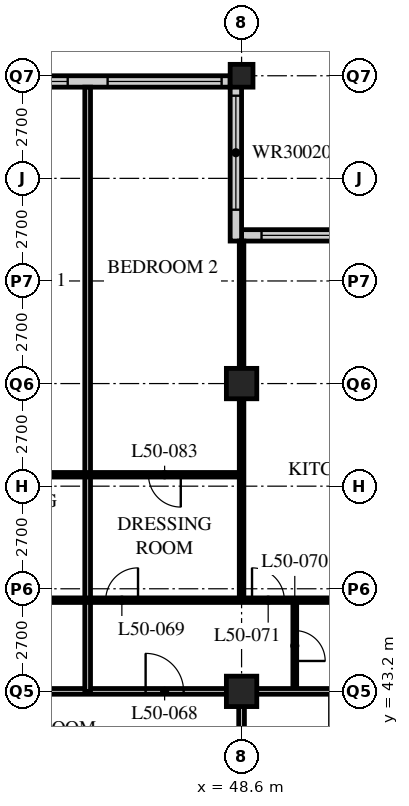
"""IFC4 building model, lengths in metres.
Left out: names, types, materials, properties, quantities, classifications, styles, units other than length and angle.
Written with IfcOpenShell. Run it as: python <this file> out.ifc"""

import sys

from ifc_helpers import new_model, si_unit, direction, frame, frame_2d, origin, origin_2d, place, context, subcontext, project, spatial, rectangle, hollow_rectangle, extrude, element, fill, save


model = new_model("IFC4")
c1 = context("Model", 3, precision=1e-05, world=origin(), true_north=direction((0.0, 1.0)))
c2 = subcontext(c1, "Body", "Model", "MODEL_VIEW")
j1 = project(units=[si_unit("LENGTHUNIT", "METRE"), si_unit("PLANEANGLEUNIT", "RADIAN")], contexts=[c1])
p1 = place(None, origin())
s1 = spatial("IfcSite", under=j1, at=p1, CompositionType="ELEMENT")
p2 = place(p1, origin())
s2 = spatial("IfcBuilding", under=s1, at=p2, CompositionType="ELEMENT")
p3 = place(p2, frame((0.0, 0.0, 195.6)))
s3 = spatial("IfcBuildingStorey", under=s2, at=p3, CompositionType="ELEMENT", Elevation=195.6)
for number, where, z_axis, x_axis in (
    (1, (48.6, 43.2, 0.0), (0.0, 0.0, 1.0), (1.0, 0.0, 0.0)),
    (2, (48.6, 51.3, 0.0), (0.0, 0.0, 1.0), (1.0, 0.0, 0.0)),
):
    element("IfcColumn", number, at=place(p3, frame(where, z_axis=z_axis, x_axis=x_axis)), inside=s3, PredefinedType="COLUMN", context=c2, shape_type="SweptSolid", body=[
        extrude(hollow_rectangle(XDim=0.8, YDim=0.8, WallThickness=0.08, at=origin_2d()), origin(), (0.0, 0.0, 1.0), 3.6),
    ])
p4 = place(p3, frame((48.6, 59.4, 0.0), z_axis=(0.0, 0.0, 1.0), x_axis=(1.0, 0.0, 0.0)))
e3 = element("IfcColumn", 3, at=p4, inside=s3, PredefinedType="COLUMN", context=c2, shape_type="SweptSolid", body=[
    extrude(hollow_rectangle(XDim=0.6, YDim=0.6, WallThickness=0.05, at=origin_2d()), origin(), (0.0, 0.0, 1.0), 3.6),
])
p5 = place(p3, frame((52.35, 55.2, 0.0), z_axis=(0.0, 0.0, 1.0), x_axis=(-1.0, 0.0, 0.0)))
e4 = element("IfcWall", 4, at=p5, inside=s3, PredefinedType="SOLIDWALL", context=c2, shape_type="SweptSolid", body=[
    extrude(rectangle(XDim=3.75, YDim=0.3, at=frame_2d((1.875, 0.0))), origin(), (0.0, 0.0, 1.0), 3.39),
])
p6 = place(p5, frame((0.225, 0.0, 0.6)))
e5 = element("IfcOpeningElement", 5, at=p6, cuts=e4, PredefinedType="OPENING", context=c2, shape_type="SweptSolid", body=[
    extrude(rectangle(XDim=3.0, YDim=2.0, at=frame_2d((1.5, 1.0))), frame((0.0, 0.16, 0.0), z_axis=(0.0, -1.0, 0.0), x_axis=(1.0, 0.0, 0.0)), (0.0, 0.0, 1.0), 0.32),
])
p7 = place(p3, frame((48.45, 55.05, 0.0), z_axis=(0.0, 0.0, 1.0), x_axis=(0.0, 1.0, 0.0)))
e6 = element("IfcWall", 6, at=p7, inside=s3, PredefinedType="SOLIDWALL", context=c2, shape_type="SweptSolid", body=[
    extrude(rectangle(XDim=4.35, YDim=0.3, at=frame_2d((2.175, 0.0))), origin(), (0.0, 0.0, 1.0), 3.39),
])
p8 = place(p7, frame((0.825, 0.0, 0.6)))
e7 = element("IfcOpeningElement", 7, at=p8, cuts=e6, PredefinedType="OPENING", context=c2, shape_type="SweptSolid", body=[
    extrude(rectangle(XDim=3.0, YDim=2.0, at=frame_2d((1.5, 1.0))), frame((0.0, 0.16, 0.0), z_axis=(0.0, -1.0, 0.0), x_axis=(1.0, 0.0, 0.0)), (0.0, 0.0, 1.0), 0.32),
])
p9 = place(p3, frame((48.3, 59.25, 0.0), z_axis=(0.0, 0.0, 1.0), x_axis=(-1.0, 0.0, 0.0)))
e8 = element("IfcWall", 8, at=p9, inside=s3, PredefinedType="SOLIDWALL", context=c2, shape_type="SweptSolid", body=[
    extrude(rectangle(XDim=40.2, YDim=0.3, at=frame_2d((20.1, 0.0))), origin(), (0.0, 0.0, 1.0), 3.39),
])
p10 = place(p9, frame((0.225, 0.0, 0.6)))
e9 = element("IfcOpeningElement", 9, at=p10, cuts=e8, PredefinedType="OPENING", context=c2, shape_type="SweptSolid", body=[
    extrude(rectangle(XDim=3.0, YDim=2.4, at=frame_2d((1.5, 1.2))), frame((0.0, 0.16, 0.0), z_axis=(0.0, -1.0, 0.0), x_axis=(1.0, 0.0, 0.0)), (0.0, 0.0, 1.0), 0.32),
])
p11 = place(p9, frame((4.275, 0.0, 0.6)))
e10 = element("IfcOpeningElement", 10, at=p11, cuts=e8, PredefinedType="OPENING", context=c2, shape_type="SweptSolid", body=[
    extrude(rectangle(XDim=3.0, YDim=2.4, at=frame_2d((1.5, 1.2))), frame((0.0, 0.16, 0.0), z_axis=(0.0, -1.0, 0.0), x_axis=(1.0, 0.0, 0.0)), (0.0, 0.0, 1.0), 0.32),
])
p12 = place(p9, frame((8.325, 0.0, 0.6)))
e11 = element("IfcOpeningElement", 11, at=p12, cuts=e8, PredefinedType="OPENING", context=c2, shape_type="SweptSolid", body=[
    extrude(rectangle(XDim=3.0, YDim=2.4, at=frame_2d((1.5, 1.2))), frame((0.0, 0.16, 0.0), z_axis=(0.0, -1.0, 0.0), x_axis=(1.0, 0.0, 0.0)), (0.0, 0.0, 1.0), 0.32),
])
p13 = place(p9, frame((12.375, 0.0, 0.6)))
e12 = element("IfcOpeningElement", 12, at=p13, cuts=e8, PredefinedType="OPENING", context=c2, shape_type="SweptSolid", body=[
    extrude(rectangle(XDim=3.0, YDim=2.4, at=frame_2d((1.5, 1.2))), frame((0.0, 0.16, 0.0), z_axis=(0.0, -1.0, 0.0), x_axis=(1.0, 0.0, 0.0)), (0.0, 0.0, 1.0), 0.32),
])
p14 = place(p9, frame((16.425, 0.0, 0.6)))
e13 = element("IfcOpeningElement", 13, at=p14, cuts=e8, PredefinedType="OPENING", context=c2, shape_type="SweptSolid", body=[
    extrude(rectangle(XDim=3.0, YDim=2.4, at=frame_2d((1.5, 1.2))), frame((0.0, 0.16, 0.0), z_axis=(0.0, -1.0, 0.0), x_axis=(1.0, 0.0, 0.0)), (0.0, 0.0, 1.0), 0.32),
])
p15 = place(p9, frame((20.475, 0.0, 0.6)))
e14 = element("IfcOpeningElement", 14, at=p15, cuts=e8, PredefinedType="OPENING", context=c2, shape_type="SweptSolid", body=[
    extrude(rectangle(XDim=3.0, YDim=2.4, at=frame_2d((1.5, 1.2))), frame((0.0, 0.16, 0.0), z_axis=(0.0, -1.0, 0.0), x_axis=(1.0, 0.0, 0.0)), (0.0, 0.0, 1.0), 0.32),
])
p16 = place(p9, frame((24.525, 0.0, 0.6)))
e15 = element("IfcOpeningElement", 15, at=p16, cuts=e8, PredefinedType="OPENING", context=c2, shape_type="SweptSolid", body=[
    extrude(rectangle(XDim=3.0, YDim=2.4, at=frame_2d((1.5, 1.2))), frame((0.0, 0.16, 0.0), z_axis=(0.0, -1.0, 0.0), x_axis=(1.0, 0.0, 0.0)), (0.0, 0.0, 1.0), 0.32),
])
p17 = place(p9, frame((28.575, 0.0, 0.6)))
e16 = element("IfcOpeningElement", 16, at=p17, cuts=e8, PredefinedType="OPENING", context=c2, shape_type="SweptSolid", body=[
    extrude(rectangle(XDim=3.0, YDim=2.4, at=frame_2d((1.5, 1.2))), frame((0.0, 0.16, 0.0), z_axis=(0.0, -1.0, 0.0), x_axis=(1.0, 0.0, 0.0)), (0.0, 0.0, 1.0), 0.32),
])
p18 = place(p9, frame((32.625, 0.0, 0.6)))
e17 = element("IfcOpeningElement", 17, at=p18, cuts=e8, PredefinedType="OPENING", context=c2, shape_type="SweptSolid", body=[
    extrude(rectangle(XDim=3.0, YDim=2.4, at=frame_2d((1.5, 1.2))), frame((0.0, 0.16, 0.0), z_axis=(0.0, -1.0, 0.0), x_axis=(1.0, 0.0, 0.0)), (0.0, 0.0, 1.0), 0.32),
])
p19 = place(p9, frame((36.675, 0.0, 0.6)))
e18 = element("IfcOpeningElement", 18, at=p19, cuts=e8, PredefinedType="OPENING", context=c2, shape_type="SweptSolid", body=[
    extrude(rectangle(XDim=3.0, YDim=2.4, at=frame_2d((1.5, 1.2))), frame((0.0, 0.16, 0.0), z_axis=(0.0, -1.0, 0.0), x_axis=(1.0, 0.0, 0.0)), (0.0, 0.0, 1.0), 0.32),
])
p20 = place(p3, frame((8.1, 43.2, 0.0), z_axis=(0.0, 0.0, 1.0), x_axis=(1.0, 0.0, 0.0)))
e19 = element("IfcWall", 19, at=p20, inside=s3, PredefinedType="PARTITIONING", context=c2, shape_type="SweptSolid", body=[
    extrude(rectangle(XDim=40.5, YDim=0.15, at=frame_2d((20.25, 0.0))), origin(), (0.0, 0.0, 1.0), 2.778),
])
p21 = place(p20, frame((4.45, 0.0, 0.0)))
e20 = element("IfcOpeningElement", 20, at=p21, cuts=e19, PredefinedType="OPENING", context=c2, shape_type="SweptSolid", body=[
    extrude(rectangle(XDim=1.0, YDim=2.1, at=frame_2d((0.5, 1.05))), frame((0.0, 0.085, 0.0), z_axis=(0.0, -1.0, 0.0), x_axis=(1.0, 0.0, 0.0)), (0.0, 0.0, 1.0), 0.17),
])
p22 = place(p20, frame((20.65, 0.0, 0.0)))
e21 = element("IfcOpeningElement", 21, at=p22, cuts=e19, PredefinedType="OPENING", context=c2, shape_type="SweptSolid", body=[
    extrude(rectangle(XDim=1.0, YDim=2.1, at=frame_2d((0.5, 1.05))), frame((0.0, 0.085, 0.0), z_axis=(0.0, -1.0, 0.0), x_axis=(1.0, 0.0, 0.0)), (0.0, 0.0, 1.0), 0.17),
])
p23 = place(p20, frame((28.75, 0.0, 0.0)))
e22 = element("IfcOpeningElement", 22, at=p23, cuts=e19, PredefinedType="OPENING", context=c2, shape_type="SweptSolid", body=[
    extrude(rectangle(XDim=1.0, YDim=2.1, at=frame_2d((0.5, 1.05))), frame((0.0, 0.085, 0.0), z_axis=(0.0, -1.0, 0.0), x_axis=(1.0, 0.0, 0.0)), (0.0, 0.0, 1.0), 0.17),
])
p24 = place(p20, frame((37.975, 0.0, 0.0)))
e23 = element("IfcOpeningElement", 23, at=p24, cuts=e19, PredefinedType="OPENING", context=c2, shape_type="SweptSolid", body=[
    extrude(rectangle(XDim=1.0, YDim=2.1, at=frame_2d((0.5, 1.05))), frame((0.0, 0.085, 0.0), z_axis=(0.0, -1.0, 0.0), x_axis=(1.0, 0.0, 0.0)), (0.0, 0.0, 1.0), 0.17),
])
p25 = place(p20, frame((1.525, 0.0, 0.0)))
e24 = element("IfcOpeningElement", 24, at=p25, cuts=e19, PredefinedType="OPENING", context=c2, shape_type="SweptSolid", body=[
    extrude(rectangle(XDim=1.0, YDim=2.1, at=frame_2d((0.5, 1.05))), frame((0.0, 0.085, 0.0), z_axis=(0.0, -1.0, 0.0), x_axis=(1.0, 0.0, 0.0)), (0.0, 0.0, 1.0), 0.17),
])
p26 = place(p3, frame((48.6, 18.9, 0.0), z_axis=(0.0, 0.0, 1.0), x_axis=(0.0, 1.0, 0.0)))
e25 = element("IfcWall", 25, at=p26, inside=s3, PredefinedType="PARTITIONING", context=c2, shape_type="SweptSolid", body=[
    extrude(rectangle(XDim=24.3, YDim=0.15, at=frame_2d((12.15, 0.0))), origin(), (0.0, 0.0, 1.0), 2.778),
])
p27 = place(p26, frame((2.35, 0.0, 0.0)))
e26 = element("IfcOpeningElement", 26, at=p27, cuts=e25, PredefinedType="OPENING", context=c2, shape_type="SweptSolid", body=[
    extrude(rectangle(XDim=1.0, YDim=2.1, at=frame_2d((0.5, 1.05))), frame((0.0, 0.085, 0.0), z_axis=(0.0, -1.0, 0.0), x_axis=(1.0, 0.0, 0.0)), (0.0, 0.0, 1.0), 0.17),
])
p28 = place(p26, frame((4.75, 0.0, 0.0)))
e27 = element("IfcOpeningElement", 27, at=p28, cuts=e25, PredefinedType="OPENING", context=c2, shape_type="SweptSolid", body=[
    extrude(rectangle(XDim=1.0, YDim=2.1, at=frame_2d((0.5, 1.05))), frame((0.0, 0.085, 0.0), z_axis=(0.0, -1.0, 0.0), x_axis=(1.0, 0.0, 0.0)), (0.0, 0.0, 1.0), 0.17),
])
p29 = place(p26, frame((9.0, 0.0, 0.0)))
e28 = element("IfcOpeningElement", 28, at=p29, cuts=e25, PredefinedType="OPENING", context=c2, shape_type="SweptSolid", body=[
    extrude(rectangle(XDim=1.0, YDim=2.1, at=frame_2d((0.5, 1.05))), frame((0.0, 0.085, 0.0), z_axis=(0.0, -1.0, 0.0), x_axis=(1.0, 0.0, 0.0)), (0.0, 0.0, 1.0), 0.17),
])
p30 = place(p3, frame((50.0, 43.2, 0.0), z_axis=(0.0, 0.0, 1.0), x_axis=(0.0, 1.0, 0.0)))
e29 = element("IfcWall", 29, at=p30, inside=s3, PredefinedType="PARTITIONING", context=c2, shape_type="SweptSolid", body=[
    extrude(rectangle(XDim=2.4, YDim=0.1, at=frame_2d((1.2, 0.0))), origin(), (0.0, 0.0, 1.0), 3.39),
])
p31 = place(p30, frame((0.8, 0.0, 0.0)))
e30 = element("IfcOpeningElement", 30, at=p31, cuts=e29, PredefinedType="OPENING", context=c2, shape_type="SweptSolid", body=[
    extrude(rectangle(XDim=0.8, YDim=2.1, at=frame_2d((0.4, 1.05))), frame((0.0, 0.06, 0.0), z_axis=(0.0, -1.0, 0.0), x_axis=(1.0, 0.0, 0.0)), (0.0, 0.0, 1.0), 0.12),
])
p32 = place(p3, frame((48.6, 45.6, 0.0), z_axis=(0.0, 0.0, 1.0), x_axis=(0.0, 1.0, 0.0)))
e31 = element("IfcWall", 31, at=p32, inside=s3, PredefinedType="PARTITIONING", context=c2, shape_type="SweptSolid", body=[
    extrude(rectangle(XDim=9.45, YDim=0.12, at=frame_2d((4.725, 0.0))), origin(), (0.0, 0.0, 1.0), 2.778),
])
p33 = place(p3, frame((48.6, 43.2, 0.0), z_axis=(0.0, 0.0, 1.0), x_axis=(1.0, 0.0, 0.0)))
e32 = element("IfcWall", 32, at=p33, inside=s3, PredefinedType="PARTITIONING", context=c2, shape_type="SweptSolid", body=[
    extrude(rectangle(XDim=7.8, YDim=0.15, at=frame_2d((3.9, 0.0))), origin(), (0.0, 0.0, 1.0), 2.778),
])
p34 = place(p3, frame((44.55, 43.2, 0.0), z_axis=(0.0, 0.0, 1.0), x_axis=(0.0, 1.0, 0.0)))
e33 = element("IfcWall", 33, at=p34, inside=s3, PredefinedType="PARTITIONING", context=c2, shape_type="SweptSolid", body=[
    extrude(rectangle(XDim=15.9, YDim=0.15, at=frame_2d((7.95, 0.0))), origin(), (0.0, 0.0, 1.0), 3.39),
])
p35 = place(p3, frame((4.1, 45.6, 0.0), z_axis=(0.0, 0.0, 1.0), x_axis=(1.0, 0.0, 0.0)))
e34 = element("IfcWall", 34, at=p35, inside=s3, PredefinedType="PARTITIONING", context=c2, shape_type="SweptSolid", body=[
    extrude(rectangle(XDim=48.5, YDim=0.12, at=frame_2d((24.25, 0.0))), origin(), (0.0, 0.0, 1.0), 3.39),
])
p36 = place(p35, frame((9.025, 0.0, 0.0)))
e35 = element("IfcOpeningElement", 35, at=p36, cuts=e34, PredefinedType="OPENING", context=c2, shape_type="SweptSolid", body=[
    extrude(rectangle(XDim=0.85, YDim=2.1, at=frame_2d((0.425, 1.05))), frame((0.0, 0.07, 0.0), z_axis=(0.0, -1.0, 0.0), x_axis=(1.0, 0.0, 0.0)), (0.0, 0.0, 1.0), 0.14),
])
p37 = place(p35, frame((16.475, 0.0, 0.0)))
e36 = element("IfcOpeningElement", 36, at=p37, cuts=e34, PredefinedType="OPENING", context=c2, shape_type="SweptSolid", body=[
    extrude(rectangle(XDim=0.85, YDim=2.1, at=frame_2d((0.425, 1.05))), frame((0.0, 0.07, 0.0), z_axis=(0.0, -1.0, 0.0), x_axis=(1.0, 0.0, 0.0)), (0.0, 0.0, 1.0), 0.14),
])
p38 = place(p35, frame((20.525, 0.0, 0.0)))
e37 = element("IfcOpeningElement", 37, at=p38, cuts=e34, PredefinedType="OPENING", context=c2, shape_type="SweptSolid", body=[
    extrude(rectangle(XDim=0.85, YDim=2.1, at=frame_2d((0.425, 1.05))), frame((0.0, 0.07, 0.0), z_axis=(0.0, -1.0, 0.0), x_axis=(1.0, 0.0, 0.0)), (0.0, 0.0, 1.0), 0.14),
])
p39 = place(p35, frame((25.225, 0.0, 0.0)))
e38 = element("IfcOpeningElement", 38, at=p39, cuts=e34, PredefinedType="OPENING", context=c2, shape_type="SweptSolid", body=[
    extrude(rectangle(XDim=0.85, YDim=2.1, at=frame_2d((0.425, 1.05))), frame((0.0, 0.07, 0.0), z_axis=(0.0, -1.0, 0.0), x_axis=(1.0, 0.0, 0.0)), (0.0, 0.0, 1.0), 0.14),
])
p40 = place(p35, frame((28.625, 0.0, 0.0)))
e39 = element("IfcOpeningElement", 39, at=p40, cuts=e34, PredefinedType="OPENING", context=c2, shape_type="SweptSolid", body=[
    extrude(rectangle(XDim=0.85, YDim=2.1, at=frame_2d((0.425, 1.05))), frame((0.0, 0.07, 0.0), z_axis=(0.0, -1.0, 0.0), x_axis=(1.0, 0.0, 0.0)), (0.0, 0.0, 1.0), 0.14),
])
p41 = place(p35, frame((33.325, 0.0, 0.0)))
e40 = element("IfcOpeningElement", 40, at=p41, cuts=e34, PredefinedType="OPENING", context=c2, shape_type="SweptSolid", body=[
    extrude(rectangle(XDim=0.85, YDim=2.1, at=frame_2d((0.425, 1.05))), frame((0.0, 0.07, 0.0), z_axis=(0.0, -1.0, 0.0), x_axis=(1.0, 0.0, 0.0)), (0.0, 0.0, 1.0), 0.14),
])
p42 = place(p35, frame((36.725, 0.0, 0.0)))
e41 = element("IfcOpeningElement", 41, at=p42, cuts=e34, PredefinedType="OPENING", context=c2, shape_type="SweptSolid", body=[
    extrude(rectangle(XDim=0.85, YDim=2.1, at=frame_2d((0.425, 1.05))), frame((0.0, 0.07, 0.0), z_axis=(0.0, -1.0, 0.0), x_axis=(1.0, 0.0, 0.0)), (0.0, 0.0, 1.0), 0.14),
])
p43 = place(p35, frame((40.925, 0.0, 0.0)))
e42 = element("IfcOpeningElement", 42, at=p43, cuts=e34, PredefinedType="OPENING", context=c2, shape_type="SweptSolid", body=[
    extrude(rectangle(XDim=0.85, YDim=2.1, at=frame_2d((0.425, 1.05))), frame((0.0, 0.07, 0.0), z_axis=(0.0, -1.0, 0.0), x_axis=(1.0, 0.0, 0.0)), (0.0, 0.0, 1.0), 0.14),
])
p44 = place(p35, frame((44.775, 0.0, 0.0)))
e43 = element("IfcOpeningElement", 43, at=p44, cuts=e34, PredefinedType="OPENING", context=c2, shape_type="SweptSolid", body=[
    extrude(rectangle(XDim=0.85, YDim=2.1, at=frame_2d((0.425, 1.05))), frame((0.0, 0.07, 0.0), z_axis=(0.0, -1.0, 0.0), x_axis=(1.0, 0.0, 0.0)), (0.0, 0.0, 1.0), 0.14),
])
p45 = place(p35, frame((6.725, 0.0, 0.0)))
e44 = element("IfcOpeningElement", 44, at=p45, cuts=e34, PredefinedType="OPENING", context=c2, shape_type="SweptSolid", body=[
    extrude(rectangle(XDim=0.85, YDim=2.1, at=frame_2d((0.425, 1.05))), frame((0.0, 0.07, 0.0), z_axis=(0.0, -1.0, 0.0), x_axis=(1.0, 0.0, 0.0)), (0.0, 0.0, 1.0), 0.14),
])
p46 = place(p35, frame((2.875, 0.0, 0.0)))
e45 = element("IfcOpeningElement", 45, at=p46, cuts=e34, PredefinedType="OPENING", context=c2, shape_type="SweptSolid", body=[
    extrude(rectangle(XDim=0.85, YDim=2.1, at=frame_2d((0.425, 1.05))), frame((0.0, 0.07, 0.0), z_axis=(0.0, -1.0, 0.0), x_axis=(1.0, 0.0, 0.0)), (0.0, 0.0, 1.0), 0.14),
])
p47 = place(p3, frame((40.5, 48.9, 0.0), z_axis=(0.0, 0.0, 1.0), x_axis=(1.0, 0.0, 0.0)))
e46 = element("IfcWall", 46, at=p47, inside=s3, PredefinedType="PARTITIONING", context=c2, shape_type="SweptSolid", body=[
    extrude(rectangle(XDim=8.1, YDim=0.12, at=frame_2d((4.05, 0.0))), origin(), (0.0, 0.0, 1.0), 3.39),
])
p48 = place(p47, frame((1.6, 0.0, 0.0)))
e47 = element("IfcOpeningElement", 47, at=p48, cuts=e46, PredefinedType="OPENING", context=c2, shape_type="SweptSolid", body=[
    extrude(rectangle(XDim=0.85, YDim=2.1, at=frame_2d((0.425, 1.05))), frame((0.0, 0.07, 0.0), z_axis=(0.0, -1.0, 0.0), x_axis=(1.0, 0.0, 0.0)), (0.0, 0.0, 1.0), 0.14),
])
p49 = place(p47, frame((5.65, 0.0, 0.0)))
e48 = element("IfcOpeningElement", 48, at=p49, cuts=e46, PredefinedType="OPENING", context=c2, shape_type="SweptSolid", body=[
    extrude(rectangle(XDim=0.85, YDim=2.1, at=frame_2d((0.425, 1.05))), frame((0.0, 0.07, 0.0), z_axis=(0.0, -1.0, 0.0), x_axis=(1.0, 0.0, 0.0)), (0.0, 0.0, 1.0), 0.14),
])
p50 = place(p6, origin())
e49 = element("IfcWindow", 49, at=p50, inside=s3, PartitioningType="SINGLE_PANEL", PredefinedType="WINDOW", context=c2, shape_type="SweptSolid", body=[
    extrude(rectangle(XDim=3.0, YDim=2.0, at=frame_2d((1.5, 1.0))), frame((0.0, 0.03, 0.0), z_axis=(0.0, -1.0, 0.0), x_axis=(1.0, 0.0, 0.0)), (0.0, 0.0, 1.0), 0.06),
])
fill(e5, e49)
p51 = place(p8, origin())
e50 = element("IfcWindow", 50, at=p51, inside=s3, PartitioningType="SINGLE_PANEL", PredefinedType="WINDOW", context=c2, shape_type="SweptSolid", body=[
    extrude(rectangle(XDim=3.0, YDim=2.0, at=frame_2d((1.5, 1.0))), frame((0.0, 0.03, 0.0), z_axis=(0.0, -1.0, 0.0), x_axis=(1.0, 0.0, 0.0)), (0.0, 0.0, 1.0), 0.06),
])
fill(e7, e50)
p52 = place(p10, origin())
e51 = element("IfcWindow", 51, at=p52, inside=s3, PartitioningType="SINGLE_PANEL", PredefinedType="WINDOW", context=c2, shape_type="SweptSolid", body=[
    extrude(rectangle(XDim=3.0, YDim=2.4, at=frame_2d((1.5, 1.2))), frame((0.0, 0.03, 0.0), z_axis=(0.0, -1.0, 0.0), x_axis=(1.0, 0.0, 0.0)), (0.0, 0.0, 1.0), 0.06),
])
fill(e9, e51)
p53 = place(p11, origin())
e52 = element("IfcWindow", 52, at=p53, inside=s3, PartitioningType="SINGLE_PANEL", PredefinedType="WINDOW", context=c2, shape_type="SweptSolid", body=[
    extrude(rectangle(XDim=3.0, YDim=2.4, at=frame_2d((1.5, 1.2))), frame((0.0, 0.03, 0.0), z_axis=(0.0, -1.0, 0.0), x_axis=(1.0, 0.0, 0.0)), (0.0, 0.0, 1.0), 0.06),
])
fill(e10, e52)
p54 = place(p24, origin())
e53 = element("IfcDoor", 53, at=p54, inside=s3, OperationType="SINGLE_SWING_LEFT", PredefinedType="DOOR", context=c2, shape_type="SweptSolid", body=[
    extrude(rectangle(XDim=1.0, YDim=2.1, at=frame_2d((0.5, 1.05))), frame((0.0, 0.025, 0.0), z_axis=(0.0, -1.0, 0.0), x_axis=(1.0, 0.0, 0.0)), (0.0, 0.0, 1.0), 0.05),
])
fill(e23, e53)
p55 = place(p43, origin())
e54 = element("IfcDoor", 54, at=p55, inside=s3, OperationType="SINGLE_SWING_RIGHT", PredefinedType="DOOR", context=c2, shape_type="SweptSolid", body=[
    extrude(rectangle(XDim=0.85, YDim=2.1, at=frame_2d((0.425, 1.05))), frame((0.0, 0.025, 0.0), z_axis=(0.0, -1.0, 0.0), x_axis=(1.0, 0.0, 0.0)), (0.0, 0.0, 1.0), 0.05),
])
fill(e42, e54)
p56 = place(p31, origin())
e55 = element("IfcDoor", 55, at=p56, inside=s3, OperationType="SINGLE_SWING_RIGHT", PredefinedType="DOOR", context=c2, shape_type="SweptSolid", body=[
    extrude(rectangle(XDim=0.8, YDim=2.1, at=frame_2d((0.4, 1.05))), frame((0.0, 0.025, 0.0), z_axis=(0.0, -1.0, 0.0), x_axis=(1.0, 0.0, 0.0)), (0.0, 0.0, 1.0), 0.05),
])
fill(e30, e55)
p57 = place(p44, origin())
e56 = element("IfcDoor", 56, at=p57, inside=s3, OperationType="SINGLE_SWING_LEFT", PredefinedType="DOOR", context=c2, shape_type="SweptSolid", body=[
    extrude(rectangle(XDim=0.85, YDim=2.1, at=frame_2d((0.425, 1.05))), frame((0.0, 0.025, 0.0), z_axis=(0.0, -1.0, 0.0), x_axis=(1.0, 0.0, 0.0)), (0.0, 0.0, 1.0), 0.05),
])
fill(e43, e56)
p58 = place(p49, origin())
e57 = element("IfcDoor", 57, at=p58, inside=s3, OperationType="SINGLE_SWING_LEFT", PredefinedType="DOOR", context=c2, shape_type="SweptSolid", body=[
    extrude(rectangle(XDim=0.85, YDim=2.1, at=frame_2d((0.425, 1.05))), frame((0.0, 0.025, 0.0), z_axis=(0.0, -1.0, 0.0), x_axis=(1.0, 0.0, 0.0)), (0.0, 0.0, 1.0), 0.05),
])
fill(e48, e57)
save(model, sys.argv[1])
